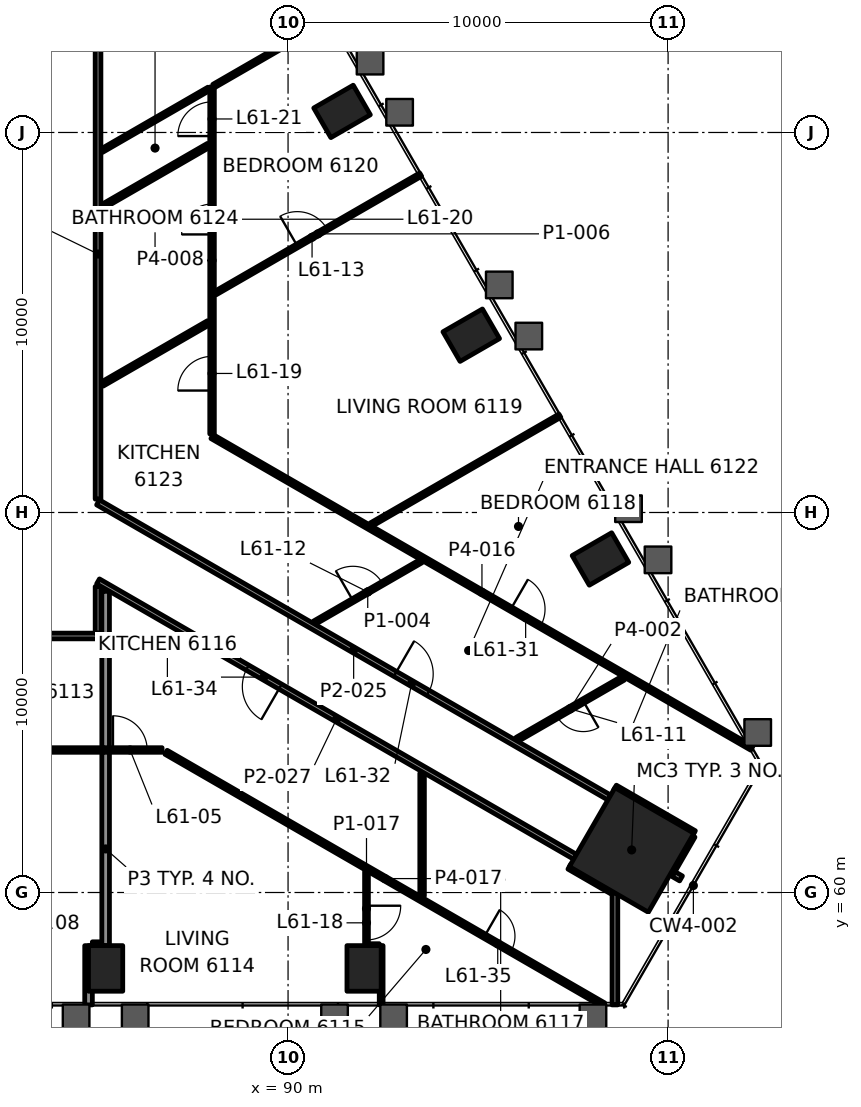
"""IFC4 building model, lengths in metres.
Left out: names, types, materials, properties, quantities, classifications, styles, units other than length and angle.
Written with IfcOpenShell. Run it as: python <this file> out.ifc"""

import sys

from ifc_helpers import new_model, si_unit, direction, frame, frame_2d, origin, origin_2d, place, context, subcontext, project, spatial, rectangle, hollow_rectangle, extrude, element, fill, save


model = new_model("IFC4")
c1 = context("Model", 3, precision=1e-05, world=origin(), true_north=direction((0.0, 1.0)))
c2 = subcontext(c1, "Body", "Model", "MODEL_VIEW")
j1 = project(units=[si_unit("LENGTHUNIT", "METRE"), si_unit("PLANEANGLEUNIT", "RADIAN")], contexts=[c1])
p1 = place(None, origin())
s1 = spatial("IfcSite", under=j1, at=p1, CompositionType="ELEMENT")
p2 = place(p1, origin())
s2 = spatial("IfcBuilding", under=s1, at=p2, CompositionType="ELEMENT")
p3 = place(p2, frame((0.0, 0.0, 260.1)))
s3 = spatial("IfcBuildingStorey", under=s2, at=p3, CompositionType="ELEMENT", Elevation=260.1)
p4 = place(p3, frame((99.041, 61.12, 0.0), z_axis=(0.0, 0.0, 1.0), x_axis=(0.5, 0.866025403784, 0.0)))
e1 = element("IfcColumn", 1, at=p4, inside=s3, PredefinedType="COLUMN", context=c2, shape_type="SweptSolid", body=[
    extrude(rectangle(XDim=2.4, YDim=2.4, at=origin_2d()), origin(), (0.0, 0.0, 1.0), 3.5),
])
for number, where, z_axis, x_axis in (
    (2, (85.2, 58.002, -0.0), (0.0, 0.0, 1.0), (1.0, 0.0, 0.0)),
    (3, (92.0, 58.002, -0.0), (0.0, 0.0, 1.0), (1.0, 0.0, 0.0)),
    (4, (98.22, 68.777, -0.0), (0.0, 0.0, 1.0), (-0.5, 0.866, 0.0)),
    (5, (94.821, 74.666, -0.0), (0.0, 0.0, 1.0), (-0.5, 0.866, 0.0)),
    (6, (91.421, 80.554, -0.0), (0.0, 0.0, 1.0), (-0.5, 0.866, 0.0)),
):
    element("IfcColumn", number, at=place(p3, frame(where, z_axis=z_axis, x_axis=x_axis)), inside=s3, PredefinedType="COLUMN", context=c2, shape_type="SweptSolid", body=[
        extrude(hollow_rectangle(XDim=0.9, YDim=1.2, WallThickness=0.06, at=origin_2d()), origin(), (0.0, 0.0, 1.0), 3.5),
    ])
p5 = place(p3, frame((84.851, 58.602, 0.0), z_axis=(0.0, 0.0, 1.0), x_axis=(1.0, 0.0, 0.0)))
e7 = element("IfcWall", 7, at=p5, inside=s3, PredefinedType="PARTITIONING", context=c2, shape_type="SweptSolid", body=[
    extrude(rectangle(XDim=0.249, YDim=0.2, at=frame_2d((0.125, 0.0))), origin(), (0.0, 0.0, 1.0), 2.7),
])
p6 = place(p3, frame((92.114, 58.602, 0.0), z_axis=(0.0, 0.0, 1.0), x_axis=(1.0, 0.0, 0.0)))
e8 = element("IfcWall", 8, at=p6, inside=s3, PredefinedType="PARTITIONING", context=c2, shape_type="SweptSolid", body=[
    extrude(rectangle(XDim=0.286, YDim=0.1, at=frame_2d((0.143, 0.0))), origin(), (0.0, 0.0, 1.0), 2.7),
])
p7 = place(p3, frame((63.314, 63.75, 0.0), z_axis=(0.0, 0.0, 1.0), x_axis=(1.0, 0.0, 0.0)))
e9 = element("IfcWall", 9, at=p7, inside=s3, PredefinedType="PARTITIONING", context=c2, shape_type="SweptSolid", body=[
    extrude(rectangle(XDim=23.371, YDim=0.12, at=frame_2d((11.686, 0.0))), origin(), (0.0, 0.0, 1.0), 2.7),
])
p8 = place(p7, frame((1.372, 0.0, 0.0)))
e10 = element("IfcOpeningElement", 10, at=p8, cuts=e9, PredefinedType="OPENING", context=c2, shape_type="SweptSolid", body=[
    extrude(rectangle(XDim=0.8, YDim=2.1, at=frame_2d((0.4, 1.05))), frame((0.0, 0.07, 0.0), z_axis=(0.0, -1.0, 0.0), x_axis=(1.0, 0.0, 0.0)), (0.0, 0.0, 1.0), 0.14),
])
p9 = place(p7, frame((6.249, 0.0, 0.0)))
e11 = element("IfcOpeningElement", 11, at=p9, cuts=e9, PredefinedType="OPENING", context=c2, shape_type="SweptSolid", body=[
    extrude(rectangle(XDim=0.9, YDim=2.1, at=frame_2d((0.45, 1.05))), frame((0.0, 0.07, 0.0), z_axis=(0.0, -1.0, 0.0), x_axis=(1.0, 0.0, 0.0)), (0.0, 0.0, 1.0), 0.14),
])
p10 = place(p7, frame((12.595, 0.0, 0.0)))
e12 = element("IfcOpeningElement", 12, at=p10, cuts=e9, PredefinedType="OPENING", context=c2, shape_type="SweptSolid", body=[
    extrude(rectangle(XDim=0.9, YDim=2.1, at=frame_2d((0.45, 1.05))), frame((0.0, 0.07, 0.0), z_axis=(0.0, -1.0, 0.0), x_axis=(1.0, 0.0, 0.0)), (0.0, 0.0, 1.0), 0.14),
])
p11 = place(p7, frame((18.992, 0.0, 0.0)))
e13 = element("IfcOpeningElement", 13, at=p11, cuts=e9, PredefinedType="OPENING", context=c2, shape_type="SweptSolid", body=[
    extrude(rectangle(XDim=0.8, YDim=2.1, at=frame_2d((0.4, 1.05))), frame((0.0, 0.07, 0.0), z_axis=(0.0, -1.0, 0.0), x_axis=(1.0, 0.0, 0.0)), (0.0, 0.0, 1.0), 0.14),
])
p12 = place(p7, frame((22.078, 0.0, 0.0)))
e14 = element("IfcOpeningElement", 14, at=p12, cuts=e9, PredefinedType="OPENING", context=c2, shape_type="SweptSolid", body=[
    extrude(rectangle(XDim=0.9, YDim=2.1, at=frame_2d((0.45, 1.05))), frame((0.0, 0.07, 0.0), z_axis=(0.0, -1.0, 0.0), x_axis=(1.0, 0.0, 0.0)), (0.0, 0.0, 1.0), 0.14),
])
p13 = place(p3, frame((85.0, 66.75, 0.0), z_axis=(0.0, 0.0, 1.0), x_axis=(-1.0, 0.0, 0.0)))
e15 = element("IfcWall", 15, at=p13, inside=s3, PredefinedType="PARTITIONING", context=c2, shape_type="SweptSolid", body=[
    extrude(rectangle(XDim=20.0, YDim=0.15, at=frame_2d((10.0, 0.0))), origin(), (0.0, 0.0, 1.0), 2.7),
])
p14 = place(p13, frame((14.487, 0.0, 0.0)))
e16 = element("IfcOpeningElement", 16, at=p14, cuts=e15, PredefinedType="OPENING", context=c2, shape_type="SweptSolid", body=[
    extrude(rectangle(XDim=1.0, YDim=2.1, at=frame_2d((0.5, 1.05))), frame((0.0, 0.085, 0.0), z_axis=(0.0, -1.0, 0.0), x_axis=(1.0, 0.0, 0.0)), (0.0, 0.0, 1.0), 0.17),
])
p15 = place(p3, frame((98.82, 65.641, 0.0), z_axis=(0.0, 0.0, 1.0), x_axis=(-0.866033195618, -0.499986503906, 0.0)))
e17 = element("IfcWall", 17, at=p15, inside=s3, PredefinedType="PARTITIONING", context=c2, shape_type="SweptSolid", body=[
    extrude(rectangle(XDim=3.228, YDim=0.12, at=frame_2d((1.614, 0.0))), origin(), (0.0, 0.0, 1.0), 2.7),
])
p16 = place(p15, frame((1.214, 0.0, 0.0)))
e18 = element("IfcOpeningElement", 18, at=p16, cuts=e17, PredefinedType="OPENING", context=c2, shape_type="SweptSolid", body=[
    extrude(rectangle(XDim=0.8, YDim=2.1, at=frame_2d((0.4, 1.05))), frame((0.0, 0.07, 0.0), z_axis=(0.0, -1.0, 0.0), x_axis=(1.0, 0.0, 0.0)), (0.0, 0.0, 1.0), 0.14),
])
p17 = place(p3, frame((90.69, 67.097, 0.0), z_axis=(0.0, 0.0, 1.0), x_axis=(0.86605167102, 0.499954501053, 0.0)))
e19 = element("IfcWall", 19, at=p17, inside=s3, PredefinedType="PARTITIONING", context=c2, shape_type="SweptSolid", body=[
    extrude(rectangle(XDim=3.248, YDim=0.1, at=frame_2d((1.624, 0.0))), origin(), (0.0, 0.0, 1.0), 2.7),
])
p18 = place(p17, frame((1.174, 0.0, 0.0)))
e20 = element("IfcOpeningElement", 20, at=p18, cuts=e19, PredefinedType="OPENING", context=c2, shape_type="SweptSolid", body=[
    extrude(rectangle(XDim=0.9, YDim=2.1, at=frame_2d((0.45, 1.05))), frame((0.0, 0.06, 0.0), z_axis=(0.0, -1.0, 0.0), x_axis=(1.0, 0.0, 0.0)), (0.0, 0.0, 1.0), 0.12),
])
p19 = place(p3, frame((92.186, 69.68, 0.0), z_axis=(0.0, 0.0, 1.0), x_axis=(0.866023225157, 0.500003773474, 0.0)))
e21 = element("IfcWall", 21, at=p19, inside=s3, PredefinedType="PARTITIONING", context=c2, shape_type="SweptSolid", body=[
    extrude(rectangle(XDim=5.734, YDim=0.1, at=frame_2d((2.867, 0.0))), origin(), (0.0, 0.0, 1.0), 2.688),
])
p20 = place(p3, frame((85.11, 73.379, 0.0), z_axis=(0.0, 0.0, 1.0), x_axis=(0.866000447062, 0.500043223821, 0.0)))
e22 = element("IfcWall", 22, at=p20, inside=s3, PredefinedType="PARTITIONING", context=c2, shape_type="SweptSolid", body=[
    extrude(rectangle(XDim=3.228, YDim=0.12, at=frame_2d((1.614, 0.0))), origin(), (0.0, 0.0, 1.0), 2.7),
])
p21 = place(p3, frame((88.086, 75.773, 0.0), z_axis=(0.0, 0.0, 1.0), x_axis=(0.86602136159, 0.500007001221, 0.0)))
e23 = element("IfcWall", 23, at=p21, inside=s3, PredefinedType="PARTITIONING", context=c2, shape_type="SweptSolid", body=[
    extrude(rectangle(XDim=6.239, YDim=0.1, at=frame_2d((3.119, 0.0))), origin(), (0.0, 0.0, 1.0), 2.688),
])
p22 = place(p21, frame((2.489, 0.0, 0.0)))
e24 = element("IfcOpeningElement", 24, at=p22, cuts=e23, PredefinedType="OPENING", context=c2, shape_type="SweptSolid", body=[
    extrude(rectangle(XDim=0.9, YDim=2.1, at=frame_2d((0.45, 1.05))), frame((0.0, 0.06, 0.0), z_axis=(0.0, -1.0, 0.0), x_axis=(1.0, 0.0, 0.0)), (0.0, 0.0, 1.0), 0.12),
])
p23 = place(p3, frame((85.109, 78.046, 0.0), z_axis=(0.0, 0.0, 1.0), x_axis=(0.866033195618, 0.499986503906, 0.0)))
e25 = element("IfcWall", 25, at=p23, inside=s3, PredefinedType="PARTITIONING", context=c2, shape_type="SweptSolid", body=[
    extrude(rectangle(XDim=3.228, YDim=0.12, at=frame_2d((1.614, 0.0))), origin(), (0.0, 0.0, 1.0), 2.7),
])
p24 = place(p3, frame((85.101, 79.523, 0.0), z_axis=(0.0, 0.0, 1.0), x_axis=(0.866029195513, 0.499993432475, 0.0)))
e26 = element("IfcWall", 26, at=p24, inside=s3, PredefinedType="PARTITIONING", context=c2, shape_type="SweptSolid", body=[
    extrude(rectangle(XDim=3.25, YDim=0.1, at=frame_2d((1.625, 0.0))), origin(), (0.0, 0.0, 1.0), 2.7),
])
p25 = place(p3, frame((100.08, 60.52, 0.0), z_axis=(0.0, 0.0, 1.0), x_axis=(0.500060622324, 0.86599040064, 0.0)))
e27 = element("IfcWall", 27, at=p25, inside=s3, PredefinedType="PARTITIONING", context=c2, shape_type="SweptSolid", body=[
    extrude(rectangle(XDim=1.125, YDim=0.15, at=frame_2d((0.562, 0.0))), origin(), (0.0, 0.0, 1.0), 2.7),
])
p26 = place(p3, frame((98.601, 57.042, 0.0), z_axis=(0.0, 0.0, 1.0), x_axis=(0.0, 1.0, 0.0)))
e28 = element("IfcWall", 28, at=p26, inside=s3, PredefinedType="PARTITIONING", context=c2, shape_type="SweptSolid", body=[
    extrude(rectangle(XDim=2.946, YDim=0.15, at=frame_2d((1.473, 0.0))), origin(), (0.0, 0.0, 1.0), 2.7),
])
p27 = place(p3, frame((93.527, 59.909, 0.0), z_axis=(0.0, 0.0, 1.0), x_axis=(0.0, 1.0, 0.0)))
e29 = element("IfcWall", 29, at=p27, inside=s3, PredefinedType="PARTITIONING", context=c2, shape_type="SweptSolid", body=[
    extrude(rectangle(XDim=3.228, YDim=0.12, at=frame_2d((1.614, 0.0))), origin(), (0.0, 0.0, 1.0), 2.7),
])
p28 = place(p3, frame((92.45, 57.042, 0.0), z_axis=(0.0, 0.0, 1.0), x_axis=(0.0, 1.0, 0.0)))
e30 = element("IfcWall", 30, at=p28, inside=s3, PredefinedType="PARTITIONING", context=c2, shape_type="SweptSolid", body=[
    extrude(rectangle(XDim=1.56, YDim=0.1, at=frame_2d((0.78, 0.0))), origin(), (0.0, 0.0, 1.0), 2.7),
])
p29 = place(p3, frame((92.064, 60.545, 0.0), z_axis=(0.0, 0.0, 1.0), x_axis=(0.0, -1.0, 0.0)))
e31 = element("IfcWall", 31, at=p29, inside=s3, PredefinedType="PARTITIONING", context=c2, shape_type="SweptSolid", body=[
    extrude(rectangle(XDim=1.943, YDim=0.1, at=frame_2d((0.972, 0.0))), origin(), (0.0, 0.0, 1.0), 2.7),
])
p30 = place(p29, frame((0.893, 0.0, 0.0)))
e32 = element("IfcOpeningElement", 32, at=p30, cuts=e31, PredefinedType="OPENING", context=c2, shape_type="SweptSolid", body=[
    extrude(rectangle(XDim=0.9, YDim=2.1, at=frame_2d((0.45, 1.05))), frame((0.0, 0.06, 0.0), z_axis=(0.0, -1.0, 0.0), x_axis=(1.0, 0.0, 0.0)), (0.0, 0.0, 1.0), 0.12),
])
p31 = place(p3, frame((88.0, 72.067, 0.0), z_axis=(0.0, 0.0, 1.0), x_axis=(0.0, 1.0, 0.0)))
e33 = element("IfcWall", 33, at=p31, inside=s3, PredefinedType="PARTITIONING", context=c2, shape_type="SweptSolid", body=[
    extrude(rectangle(XDim=9.13, YDim=0.12, at=frame_2d((4.565, 0.0))), origin(), (0.0, 0.0, 1.0), 2.7),
])
p32 = place(p31, frame((1.142, 0.0, 0.0)))
e34 = element("IfcOpeningElement", 34, at=p32, cuts=e33, PredefinedType="OPENING", context=c2, shape_type="SweptSolid", body=[
    extrude(rectangle(XDim=0.9, YDim=2.1, at=frame_2d((0.45, 1.05))), frame((0.0, 0.07, 0.0), z_axis=(0.0, -1.0, 0.0), x_axis=(1.0, 0.0, 0.0)), (0.0, 0.0, 1.0), 0.14),
])
p33 = place(p31, frame((5.25, 0.0, 0.0)))
e35 = element("IfcOpeningElement", 35, at=p33, cuts=e33, PredefinedType="OPENING", context=c2, shape_type="SweptSolid", body=[
    extrude(rectangle(XDim=0.8, YDim=2.1, at=frame_2d((0.4, 1.05))), frame((0.0, 0.07, 0.0), z_axis=(0.0, -1.0, 0.0), x_axis=(1.0, 0.0, 0.0)), (0.0, 0.0, 1.0), 0.14),
])
p34 = place(p31, frame((7.838, 0.0, 0.0)))
e36 = element("IfcOpeningElement", 36, at=p34, cuts=e33, PredefinedType="OPENING", context=c2, shape_type="SweptSolid", body=[
    extrude(rectangle(XDim=0.9, YDim=2.1, at=frame_2d((0.45, 1.05))), frame((0.0, 0.07, 0.0), z_axis=(0.0, -1.0, 0.0), x_axis=(1.0, 0.0, 0.0)), (0.0, 0.0, 1.0), 0.14),
])
p35 = place(p3, frame((85.2, 58.603, 0.0), z_axis=(0.0, 0.0, 1.0), x_axis=(0.0, 1.0, 0.0)))
e37 = element("IfcWall", 37, at=p35, inside=s3, PredefinedType="PARTITIONING", context=c2, shape_type="SweptSolid", body=[
    extrude(rectangle(XDim=5.087, YDim=0.2, at=frame_2d((2.544, 0.0))), origin(), (0.0, 0.0, 1.0), 2.7),
])
p36 = place(p3, frame((85.0, 66.825, 0.0), z_axis=(0.0, 0.0, 1.0), x_axis=(0.0, 1.0, 0.0)))
e38 = element("IfcWall", 38, at=p36, inside=s3, PredefinedType="PARTITIONING", context=c2, shape_type="SweptSolid", body=[
    extrude(rectangle(XDim=1.226, YDim=0.15, at=frame_2d((0.613, 0.0))), origin(), (0.0, 0.0, 1.0), 2.547),
])
p37 = place(p3, frame((85.0, 70.352, 0.0), z_axis=(0.0, 0.0, 1.0), x_axis=(0.0, 1.0, 0.0)))
e39 = element("IfcWall", 39, at=p37, inside=s3, PredefinedType="PARTITIONING", context=c2, shape_type="SweptSolid", body=[
    extrude(rectangle(XDim=12.897, YDim=0.15, at=frame_2d((6.449, 0.0))), origin(), (0.0, 0.0, 1.0), 2.7),
])
p38 = place(p3, frame((84.75, 57.042, 0.0), z_axis=(0.0, 0.0, 1.0), x_axis=(0.0, 1.0, 0.0)))
e40 = element("IfcWall", 40, at=p38, inside=s3, PredefinedType="PARTITIONING", context=c2, shape_type="SweptSolid", body=[
    extrude(rectangle(XDim=1.559, YDim=0.2, at=frame_2d((0.78, 0.0))), origin(), (0.0, 0.0, 1.0), 2.688),
])
p39 = place(p3, frame((88.0, 71.998, 0.0), z_axis=(0.0, 0.0, 1.0), x_axis=(0.866029666338, -0.499992616969, 0.0)))
e41 = element("IfcWall", 41, at=p39, inside=s3, PredefinedType="PARTITIONING", context=c2, shape_type="SweptSolid", body=[
    extrude(rectangle(XDim=16.401, YDim=0.12, at=frame_2d((8.201, 0.0))), origin(), (0.0, 0.0, 1.0), 2.7),
])
p40 = place(p39, frame((9.078, 0.0, 0.0)))
e42 = element("IfcOpeningElement", 42, at=p40, cuts=e41, PredefinedType="OPENING", context=c2, shape_type="SweptSolid", body=[
    extrude(rectangle(XDim=0.9, YDim=2.1, at=frame_2d((0.45, 1.05))), frame((0.0, 0.07, 0.0), z_axis=(0.0, -1.0, 0.0), x_axis=(1.0, 0.0, 0.0)), (0.0, 0.0, 1.0), 0.14),
])
p41 = place(p3, frame((100.68, 61.559, 0.0), z_axis=(0.0, 0.0, 1.0), x_axis=(-0.866024647952, 0.500001309137, 0.0)))
e43 = element("IfcWall", 43, at=p41, inside=s3, PredefinedType="PARTITIONING", context=c2, shape_type="SweptSolid", body=[
    extrude(rectangle(XDim=2.4, YDim=0.15, at=frame_2d((1.2, 0.0))), origin(), (0.0, 0.0, 1.0), 2.7),
])
p42 = place(p3, frame((85.0, 70.266, 0.0), z_axis=(0.0, 0.0, 1.0), x_axis=(0.866021473228, -0.500006807861, 0.0)))
e44 = element("IfcWall", 44, at=p42, inside=s3, PredefinedType="PARTITIONING", context=c2, shape_type="SweptSolid", body=[
    extrude(rectangle(XDim=15.533, YDim=0.15, at=frame_2d((7.767, 0.0))), origin(), (0.0, 0.0, 1.0), 2.7),
])
p43 = place(p42, frame((9.029, 0.0, 0.0)))
e45 = element("IfcOpeningElement", 45, at=p43, cuts=e44, PredefinedType="OPENING", context=c2, shape_type="SweptSolid", body=[
    extrude(rectangle(XDim=1.0, YDim=2.1, at=frame_2d((0.5, 1.05))), frame((0.0, 0.085, 0.0), z_axis=(0.0, -1.0, 0.0), x_axis=(1.0, 0.0, 0.0)), (0.0, 0.0, 1.0), 0.17),
])
p44 = place(p3, frame((100.34, 60.37, 0.0), z_axis=(0.0, 0.0, 1.0), x_axis=(-0.866167537795, 0.499753735824, 0.0)))
e46 = element("IfcWall", 46, at=p44, inside=s3, PredefinedType="PARTITIONING", context=c2, shape_type="SweptSolid", body=[
    extrude(rectangle(XDim=0.225, YDim=0.15, at=frame_2d((0.113, 0.0))), origin(), (0.0, 0.0, 1.0), 2.7),
])
p45 = place(p3, frame((97.552, 60.94, 0.0), z_axis=(0.0, 0.0, 1.0), x_axis=(-0.866027660432, 0.499996091351, 0.0)))
e47 = element("IfcWall", 47, at=p45, inside=s3, PredefinedType="PARTITIONING", context=c2, shape_type="SweptSolid", body=[
    extrude(rectangle(XDim=14.494, YDim=0.15, at=frame_2d((7.247, 0.0))), origin(), (0.0, 0.0, 1.0), 2.547),
])
p46 = place(p45, frame((8.955, 0.0, 0.0)))
e48 = element("IfcOpeningElement", 48, at=p46, cuts=e47, PredefinedType="OPENING", context=c2, shape_type="SweptSolid", body=[
    extrude(rectangle(XDim=1.0, YDim=2.1, at=frame_2d((0.5, 1.05))), frame((0.0, 0.085, 0.0), z_axis=(0.0, -1.0, 0.0), x_axis=(1.0, 0.0, 0.0)), (0.0, 0.0, 1.0), 0.17),
])
p47 = place(p3, frame((98.526, 60.032, 0.0), z_axis=(0.0, 0.0, 1.0), x_axis=(-0.866069663658, 0.499923331814, 0.0)))
e49 = element("IfcWall", 49, at=p47, inside=s3, PredefinedType="PARTITIONING", context=c2, shape_type="SweptSolid", body=[
    extrude(rectangle(XDim=1.298, YDim=0.15, at=frame_2d((0.649, 0.0))), origin(), (0.0, 0.0, 1.0), 2.7),
])
p48 = place(p3, frame((86.79, 63.69, 0.0), z_axis=(0.0, 0.0, 1.0), x_axis=(0.866026581292, -0.499997960491, 0.0)))
e50 = element("IfcWall", 50, at=p48, inside=s3, PredefinedType="PARTITIONING", context=c2, shape_type="SweptSolid", body=[
    extrude(rectangle(XDim=13.296, YDim=0.12, at=frame_2d((6.648, 0.0))), origin(), (0.0, 0.0, 1.0), 2.7),
])
p49 = place(p48, frame((9.678, 0.0, 0.0)))
e51 = element("IfcOpeningElement", 51, at=p49, cuts=e50, PredefinedType="OPENING", context=c2, shape_type="SweptSolid", body=[
    extrude(rectangle(XDim=0.8, YDim=2.1, at=frame_2d((0.4, 1.05))), frame((0.0, 0.07, 0.0), z_axis=(0.0, -1.0, 0.0), x_axis=(1.0, 0.0, 0.0)), (0.0, 0.0, 1.0), 0.14),
])
p50 = place(p3, frame((85.2, 63.81, 0.0), z_axis=(0.0, 0.0, 1.0), x_axis=(0.0, 1.0, 0.0)))
e52 = element("IfcWall", 52, at=p50, inside=s3, PredefinedType="PARTITIONING", context=c2, shape_type="SweptSolid", body=[
    extrude(rectangle(XDim=4.115, YDim=0.2, at=frame_2d((2.058, 0.0))), origin(), (0.0, 0.0, 1.0), 2.547),
])
p51 = place(p3, frame((88.045, 81.223, 0.0), z_axis=(0.0, 0.0, 1.0), x_axis=(0.866020634781, 0.500008260065, 0.0)))
e53 = element("IfcWall", 53, at=p51, inside=s3, PredefinedType="PARTITIONING", context=c2, shape_type="SweptSolid", body=[
    extrude(rectangle(XDim=3.549, YDim=0.1, at=frame_2d((1.775, 0.0))), origin(), (0.0, 0.0, 1.0), 2.688),
])
p52 = place(p12, origin())
e54 = element("IfcDoor", 54, at=p52, inside=s3, OperationType="SINGLE_SWING_RIGHT", PredefinedType="DOOR", context=c2, shape_type="SweptSolid", body=[
    extrude(rectangle(XDim=0.9, YDim=2.1, at=frame_2d((0.45, 1.05))), frame((0.0, 0.025, 0.0), z_axis=(0.0, -1.0, 0.0), x_axis=(1.0, 0.0, 0.0)), (0.0, 0.0, 1.0), 0.05),
])
fill(e14, e54)
p53 = place(p16, origin())
e55 = element("IfcDoor", 55, at=p53, inside=s3, OperationType="SINGLE_SWING_RIGHT", PredefinedType="DOOR", context=c2, shape_type="SweptSolid", body=[
    extrude(rectangle(XDim=0.8, YDim=2.1, at=frame_2d((0.4, 1.05))), frame((0.0, 0.025, 0.0), z_axis=(0.0, -1.0, 0.0), x_axis=(1.0, 0.0, 0.0)), (0.0, 0.0, 1.0), 0.05),
])
fill(e18, e55)
p54 = place(p18, origin())
e56 = element("IfcDoor", 56, at=p54, inside=s3, OperationType="SINGLE_SWING_LEFT", PredefinedType="DOOR", context=c2, shape_type="SweptSolid", body=[
    extrude(rectangle(XDim=0.9, YDim=2.1, at=frame_2d((0.45, 1.05))), frame((0.0, 0.025, 0.0), z_axis=(0.0, -1.0, 0.0), x_axis=(1.0, 0.0, 0.0)), (0.0, 0.0, 1.0), 0.05),
])
fill(e20, e56)
p55 = place(p22, origin())
e57 = element("IfcDoor", 57, at=p55, inside=s3, OperationType="SINGLE_SWING_LEFT", PredefinedType="DOOR", context=c2, shape_type="SweptSolid", body=[
    extrude(rectangle(XDim=0.9, YDim=2.1, at=frame_2d((0.45, 1.05))), frame((0.0, 0.025, 0.0), z_axis=(0.0, -1.0, 0.0), x_axis=(1.0, 0.0, 0.0)), (0.0, 0.0, 1.0), 0.05),
])
fill(e24, e57)
p56 = place(p30, origin())
e58 = element("IfcDoor", 58, at=p56, inside=s3, OperationType="SINGLE_SWING_RIGHT", PredefinedType="DOOR", context=c2, shape_type="SweptSolid", body=[
    extrude(rectangle(XDim=0.9, YDim=2.1, at=frame_2d((0.45, 1.05))), frame((0.0, 0.025, 0.0), z_axis=(0.0, -1.0, 0.0), x_axis=(1.0, 0.0, 0.0)), (0.0, 0.0, 1.0), 0.05),
])
fill(e32, e58)
p57 = place(p32, origin())
e59 = element("IfcDoor", 59, at=p57, inside=s3, OperationType="SINGLE_SWING_RIGHT", PredefinedType="DOOR", context=c2, shape_type="SweptSolid", body=[
    extrude(rectangle(XDim=0.9, YDim=2.1, at=frame_2d((0.45, 1.05))), frame((0.0, 0.025, 0.0), z_axis=(0.0, -1.0, 0.0), x_axis=(1.0, 0.0, 0.0)), (0.0, 0.0, 1.0), 0.05),
])
fill(e34, e59)
p58 = place(p33, origin())
e60 = element("IfcDoor", 60, at=p58, inside=s3, OperationType="SINGLE_SWING_LEFT", PredefinedType="DOOR", context=c2, shape_type="SweptSolid", body=[
    extrude(rectangle(XDim=0.8, YDim=2.1, at=frame_2d((0.4, 1.05))), frame((0.0, 0.025, 0.0), z_axis=(0.0, -1.0, 0.0), x_axis=(1.0, 0.0, 0.0)), (0.0, 0.0, 1.0), 0.05),
])
fill(e35, e60)
p59 = place(p34, origin())
e61 = element("IfcDoor", 61, at=p59, inside=s3, OperationType="SINGLE_SWING_RIGHT", PredefinedType="DOOR", context=c2, shape_type="SweptSolid", body=[
    extrude(rectangle(XDim=0.9, YDim=2.1, at=frame_2d((0.45, 1.05))), frame((0.0, 0.025, 0.0), z_axis=(0.0, -1.0, 0.0), x_axis=(1.0, 0.0, 0.0)), (0.0, 0.0, 1.0), 0.05),
])
fill(e36, e61)
p60 = place(p40, origin())
e62 = element("IfcDoor", 62, at=p60, inside=s3, OperationType="SINGLE_SWING_LEFT", PredefinedType="DOOR", context=c2, shape_type="SweptSolid", body=[
    extrude(rectangle(XDim=0.9, YDim=2.1, at=frame_2d((0.45, 1.05))), frame((0.0, 0.025, 0.0), z_axis=(0.0, -1.0, 0.0), x_axis=(1.0, 0.0, 0.0)), (0.0, 0.0, 1.0), 0.05),
])
fill(e42, e62)
p61 = place(p43, origin())
e63 = element("IfcDoor", 63, at=p61, inside=s3, OperationType="SINGLE_SWING_LEFT", PredefinedType="DOOR", context=c2, shape_type="SweptSolid", body=[
    extrude(rectangle(XDim=1.0, YDim=2.1, at=frame_2d((0.5, 1.05))), frame((0.0, 0.025, 0.0), z_axis=(0.0, -1.0, 0.0), x_axis=(1.0, 0.0, 0.0)), (0.0, 0.0, 1.0), 0.05),
])
fill(e45, e63)
p62 = place(p46, origin())
e64 = element("IfcDoor", 64, at=p62, inside=s3, OperationType="SINGLE_SWING_LEFT", PredefinedType="DOOR", context=c2, shape_type="SweptSolid", body=[
    extrude(rectangle(XDim=1.0, YDim=2.1, at=frame_2d((0.5, 1.05))), frame((0.0, 0.025, 0.0), z_axis=(0.0, -1.0, 0.0), x_axis=(1.0, 0.0, 0.0)), (0.0, 0.0, 1.0), 0.05),
])
fill(e48, e64)
p63 = place(p49, origin())
e65 = element("IfcDoor", 65, at=p63, inside=s3, OperationType="SINGLE_SWING_LEFT", PredefinedType="DOOR", context=c2, shape_type="SweptSolid", body=[
    extrude(rectangle(XDim=0.8, YDim=2.1, at=frame_2d((0.4, 1.05))), frame((0.0, 0.025, 0.0), z_axis=(0.0, -1.0, 0.0), x_axis=(1.0, 0.0, 0.0)), (0.0, 0.0, 1.0), 0.05),
])
fill(e51, e65)
save(model, sys.argv[1])
